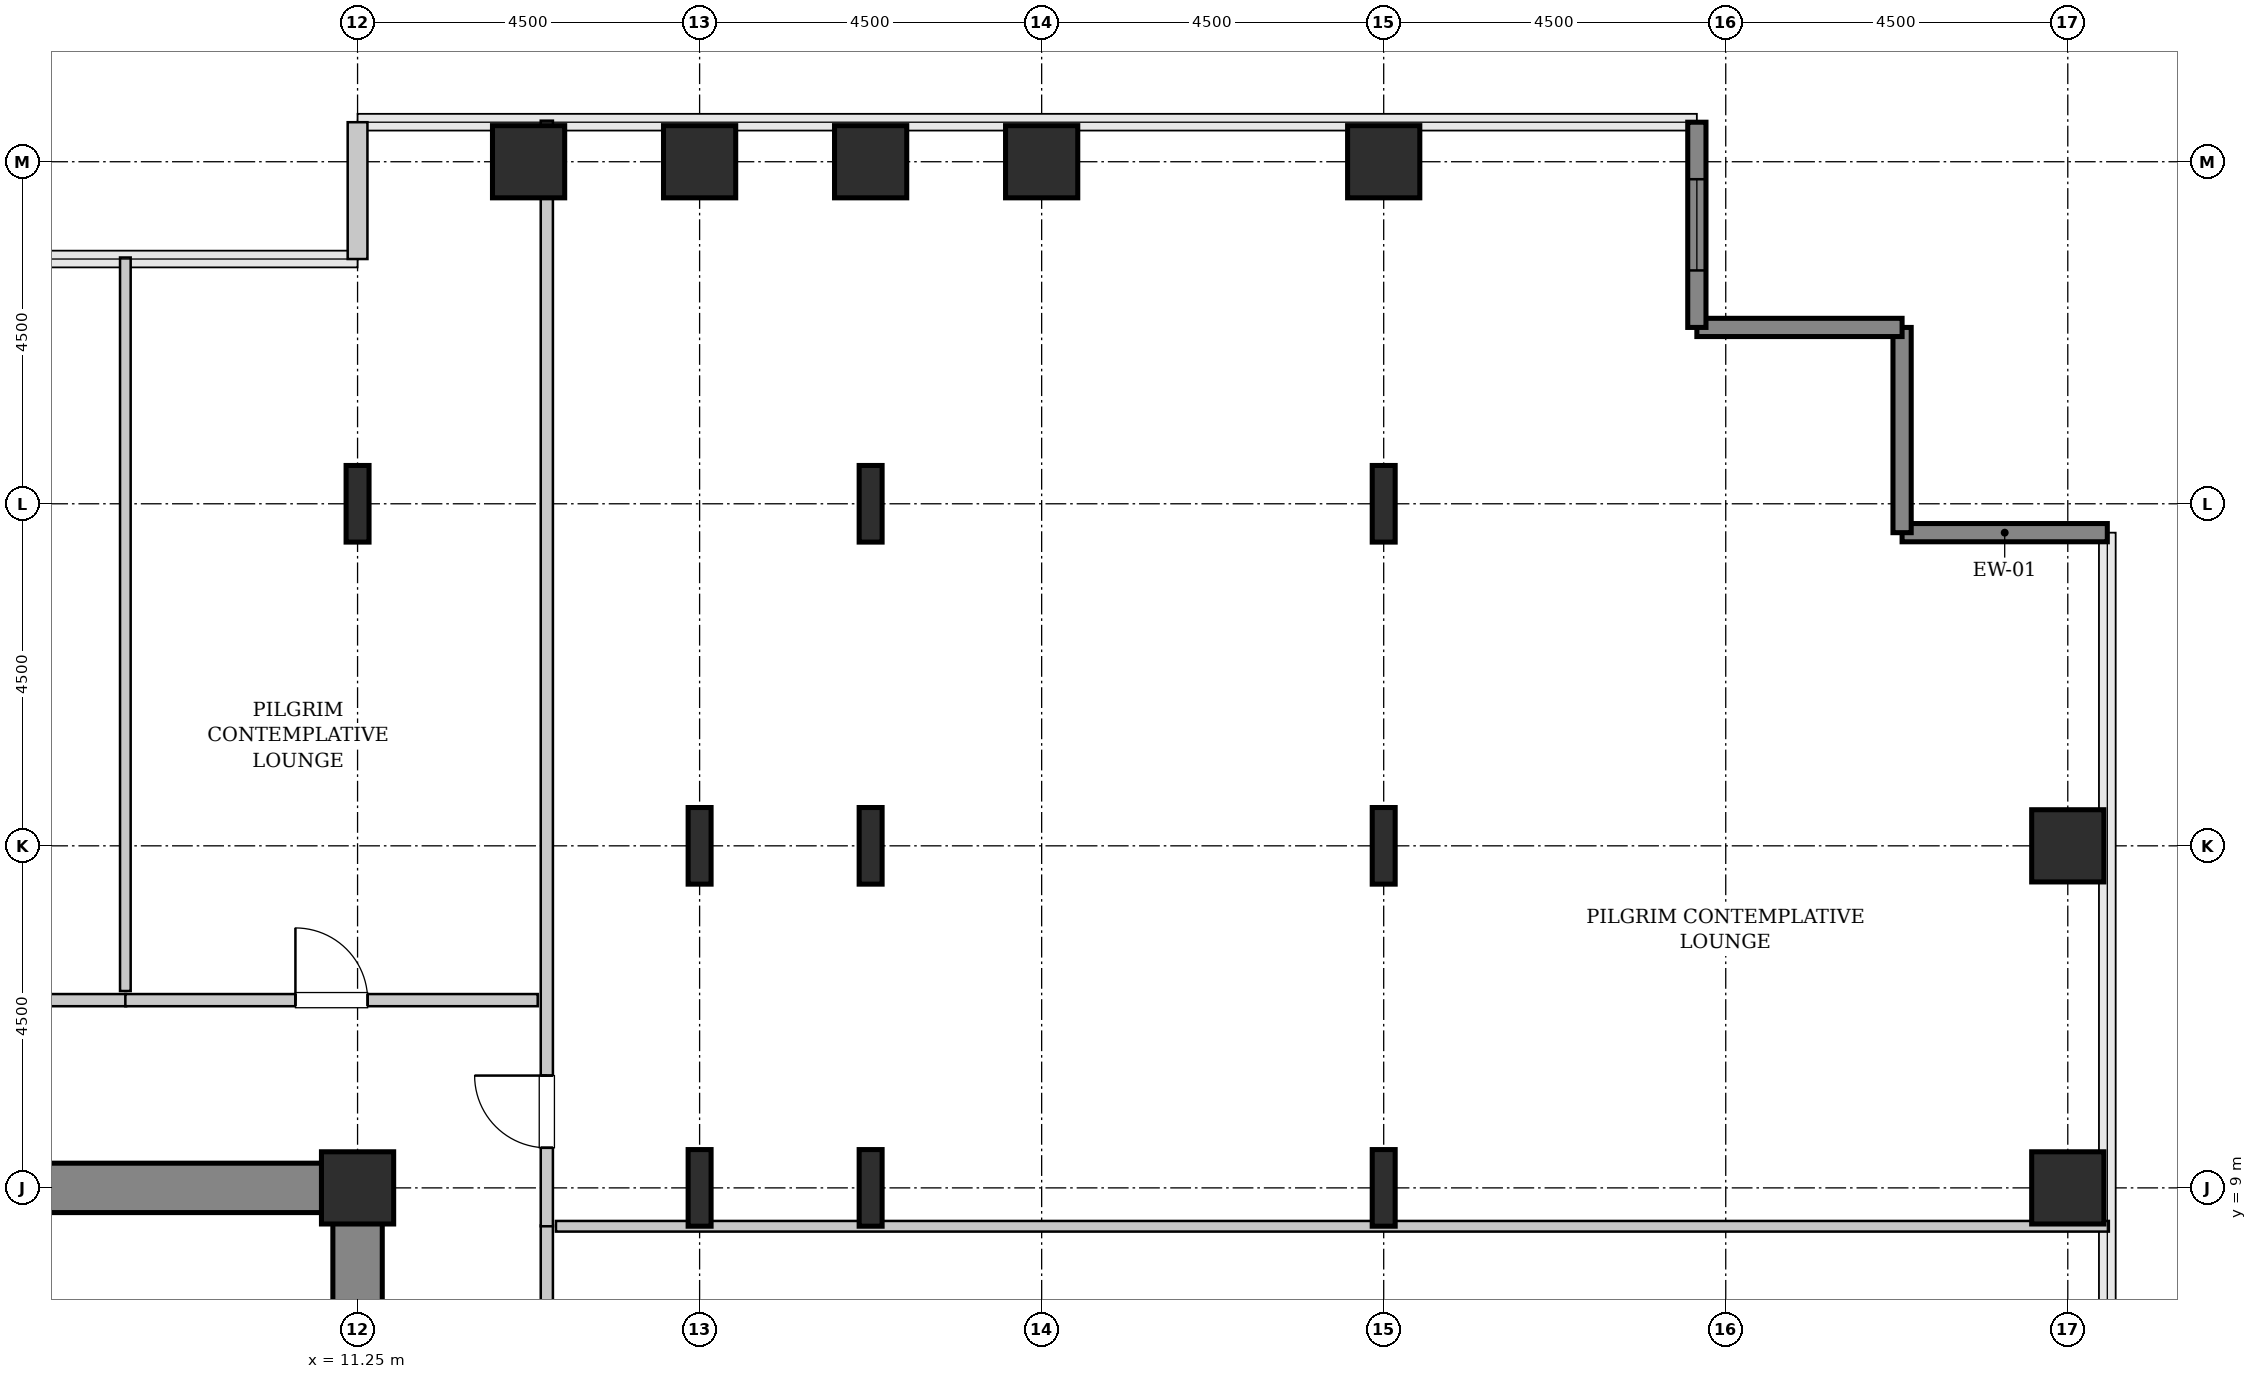
"""IFC4 building model, lengths in metres.
Left out: names, types, materials, properties, quantities, classifications, styles, units other than length and angle.
Written with IfcOpenShell. Run it as: python <this file> out.ifc"""

import sys

from ifc_helpers import new_model, si_unit, direction, frame, frame_2d, origin, origin_2d, place, context, subcontext, project, spatial, rectangle, hollow_rectangle, i_section, extrude, source, transform, mapped, element, fill, save


model = new_model("IFC4")
c1 = context("Model", 3, precision=1e-05, world=origin(), true_north=direction((0.0, 1.0)))
c2 = subcontext(c1, "Body", "Model", "MODEL_VIEW")
j1 = project(units=[si_unit("LENGTHUNIT", "METRE"), si_unit("PLANEANGLEUNIT", "RADIAN")], contexts=[c1])
p1 = place(None, origin())
s1 = spatial("IfcSite", under=j1, at=p1, CompositionType="ELEMENT")
p2 = place(p1, origin())
s2 = spatial("IfcBuilding", under=s1, at=p2, CompositionType="ELEMENT")
p3 = place(p2, frame((0.0, 0.0, 40.6)))
s3 = spatial("IfcBuildingStorey", under=s2, at=p3, CompositionType="ELEMENT", Elevation=40.6)
m1 = source(origin(), c2, "Body", "SweptSolid", [
    extrude(rectangle(XDim=10.025, YDim=0.65, at=frame_2d((5.012, 0.0))), origin(), (0.0, 0.0, 1.0), 3.8),
])
p4 = place(p3, frame((1.55, 9.0, 0.0), z_axis=(0.0, 0.0, 1.0), x_axis=(1.0, 0.0, 0.0)))
e1 = element("IfcWall", 1, at=p4, inside=s3, PredefinedType="SHEAR", context=c2, shape_type="MappedRepresentation", body=[
    mapped(m1, transform((0.0, 0.0, 0.0), x_axis=(1.0, 0.0, 0.0), y_axis=(0.0, 1.0, 0.0), z_axis=(0.0, 0.0, 1.0), scale=1.0)),
])
m2 = source(origin(), c2, "Body", "SweptSolid", [
    extrude(rectangle(XDim=7.325, YDim=0.65, at=frame_2d((3.663, 0.0))), origin(), (0.0, 0.0, 1.0), 3.8),
])
p5 = place(p3, frame((11.25, 1.35, 0.0), z_axis=(0.0, 0.0, 1.0), x_axis=(0.0, 1.0, 0.0)))
e2 = element("IfcWall", 2, at=p5, inside=s3, PredefinedType="SHEAR", context=c2, shape_type="MappedRepresentation", body=[
    mapped(m2, transform((0.0, 0.0, 0.0), x_axis=(1.0, 0.0, 0.0), y_axis=(0.0, 1.0, 0.0), z_axis=(0.0, 0.0, 1.0), scale=1.0)),
])
m3 = source(origin(), c2, "Body", "SweptSolid", [
    extrude(hollow_rectangle(XDim=0.95, YDim=0.95, WallThickness=0.045, InnerFilletRadius=0.045, OuterFilletRadius=0.09, at=origin_2d()), origin(), (0.0, 0.0, 1.0), 3.8),
])
p6 = place(p3, frame((11.25, 9.0, 0.0), z_axis=(0.0, 0.0, 1.0), x_axis=(1.0, 0.0, 0.0)))
e3 = element("IfcColumn", 3, at=p6, inside=s3, PredefinedType="COLUMN", context=c2, shape_type="MappedRepresentation", body=[
    mapped(m3, transform((0.0, 0.0, 0.0), x_axis=(1.0, 0.0, 0.0), y_axis=(0.0, 1.0, 0.0), z_axis=(0.0, 0.0, 1.0), scale=1.0)),
])
m4 = source(origin(), c2, "Body", "SweptSolid", [
    extrude(i_section(OverallWidth=0.302, OverallDepth=1.008, WebThickness=0.021, FlangeThickness=0.04, FilletRadius=0.03, at=origin_2d()), origin(), (0.0, 0.0, 1.0), 3.8),
])
p7 = place(p3, frame((11.25, 18.0, 0.0), z_axis=(0.0, 0.0, 1.0), x_axis=(1.0, 0.0, 0.0)))
e4 = element("IfcColumn", 4, at=p7, inside=s3, PredefinedType="COLUMN", context=c2, shape_type="MappedRepresentation", body=[
    mapped(m4, transform((0.0, 0.0, 0.0), x_axis=(1.0, 0.0, 0.0), y_axis=(0.0, 1.0, 0.0), z_axis=(0.0, 0.0, 1.0), scale=1.0)),
])
m5 = source(origin(), c2, "Body", "SweptSolid", [
    extrude(hollow_rectangle(XDim=0.95, YDim=0.95, WallThickness=0.045, InnerFilletRadius=0.045, OuterFilletRadius=0.09, at=origin_2d()), origin(), (0.0, 0.0, 1.0), 3.8),
])
p8 = place(p3, frame((13.5, 22.5, 0.0), z_axis=(0.0, 0.0, 1.0), x_axis=(1.0, 0.0, 0.0)))
e5 = element("IfcColumn", 5, at=p8, inside=s3, PredefinedType="COLUMN", context=c2, shape_type="MappedRepresentation", body=[
    mapped(m5, transform((0.0, 0.0, 0.0), x_axis=(1.0, 0.0, 0.0), y_axis=(0.0, 1.0, 0.0), z_axis=(0.0, 0.0, 1.0), scale=1.0)),
])
for number, where, z_axis, x_axis in (
    (6, (15.75, 9.0, 0.0), (0.0, 0.0, 1.0), (1.0, 0.0, 0.0)),
    (7, (15.75, 13.5, 0.0), (0.0, 0.0, 1.0), (1.0, 0.0, 0.0)),
):
    element("IfcColumn", number, at=place(p3, frame(where, z_axis=z_axis, x_axis=x_axis)), inside=s3, PredefinedType="COLUMN", context=c2, shape_type="MappedRepresentation", body=[
        mapped(m4, transform((0.0, 0.0, 0.0), x_axis=(1.0, 0.0, 0.0), y_axis=(0.0, 1.0, 0.0), z_axis=(0.0, 0.0, 1.0), scale=1.0)),
    ])
p9 = place(p3, frame((15.75, 22.5, 0.0), z_axis=(0.0, 0.0, 1.0), x_axis=(1.0, 0.0, 0.0)))
e8 = element("IfcColumn", 8, at=p9, inside=s3, PredefinedType="COLUMN", context=c2, shape_type="MappedRepresentation", body=[
    mapped(m5, transform((0.0, 0.0, 0.0), x_axis=(1.0, 0.0, 0.0), y_axis=(0.0, 1.0, 0.0), z_axis=(0.0, 0.0, 1.0), scale=1.0)),
])
for number, where, z_axis, x_axis in (
    (9, (18.0, 9.0, 0.0), (0.0, 0.0, 1.0), (1.0, 0.0, 0.0)),
    (10, (18.0, 13.5, 0.0), (0.0, 0.0, 1.0), (1.0, 0.0, 0.0)),
    (11, (18.0, 18.0, 0.0), (0.0, 0.0, 1.0), (1.0, 0.0, 0.0)),
):
    element("IfcColumn", number, at=place(p3, frame(where, z_axis=z_axis, x_axis=x_axis)), inside=s3, PredefinedType="COLUMN", context=c2, shape_type="MappedRepresentation", body=[
        mapped(m4, transform((0.0, 0.0, 0.0), x_axis=(1.0, 0.0, 0.0), y_axis=(0.0, 1.0, 0.0), z_axis=(0.0, 0.0, 1.0), scale=1.0)),
    ])
for number, where, z_axis, x_axis in (
    (12, (18.0, 22.5, 0.0), (0.0, 0.0, 1.0), (1.0, 0.0, 0.0)),
    (13, (20.25, 22.5, 0.0), (0.0, 0.0, 1.0), (1.0, 0.0, 0.0)),
):
    element("IfcColumn", number, at=place(p3, frame(where, z_axis=z_axis, x_axis=x_axis)), inside=s3, PredefinedType="COLUMN", context=c2, shape_type="MappedRepresentation", body=[
        mapped(m5, transform((0.0, 0.0, 0.0), x_axis=(1.0, 0.0, 0.0), y_axis=(0.0, 1.0, 0.0), z_axis=(0.0, 0.0, 1.0), scale=1.0)),
    ])
for number, where, z_axis, x_axis in (
    (14, (24.75, 9.0, 0.0), (0.0, 0.0, 1.0), (1.0, 0.0, 0.0)),
    (15, (24.75, 13.5, 0.0), (0.0, 0.0, 1.0), (1.0, 0.0, 0.0)),
    (16, (24.75, 18.0, 0.0), (0.0, 0.0, 1.0), (1.0, 0.0, 0.0)),
):
    element("IfcColumn", number, at=place(p3, frame(where, z_axis=z_axis, x_axis=x_axis)), inside=s3, PredefinedType="COLUMN", context=c2, shape_type="MappedRepresentation", body=[
        mapped(m4, transform((0.0, 0.0, 0.0), x_axis=(1.0, 0.0, 0.0), y_axis=(0.0, 1.0, 0.0), z_axis=(0.0, 0.0, 1.0), scale=1.0)),
    ])
for number, where, z_axis, x_axis in (
    (17, (24.75, 22.5, 0.0), (0.0, 0.0, 1.0), (1.0, 0.0, 0.0)),
    (18, (33.75, 9.0, 0.0), (0.0, 0.0, 1.0), (1.0, 0.0, 0.0)),
    (19, (33.75, 13.5, 0.0), (0.0, 0.0, 1.0), (1.0, 0.0, 0.0)),
):
    element("IfcColumn", number, at=place(p3, frame(where, z_axis=z_axis, x_axis=x_axis)), inside=s3, PredefinedType="COLUMN", context=c2, shape_type="MappedRepresentation", body=[
        mapped(m5, transform((0.0, 0.0, 0.0), x_axis=(1.0, 0.0, 0.0), y_axis=(0.0, 1.0, 0.0), z_axis=(0.0, 0.0, 1.0), scale=1.0)),
    ])
m6 = source(origin(), c2, "Body", "SweptSolid", [
    extrude(rectangle(XDim=2.7, YDim=0.24, at=frame_2d((1.35, 0.0))), origin(), (0.0, 0.0, 1.0), 3.55),
])
for number, where, z_axis, x_axis in (
    (20, (34.27, 17.62, 0.0), (0.0, 0.0, 1.0), (-1.0, 0.0, 0.0)),
    (21, (31.57, 17.62, 0.0), (0.0, 0.0, 1.0), (0.0, 1.0, 0.0)),
    (22, (31.57, 20.32, 0.0), (0.0, 0.0, 1.0), (-1.0, 0.0, 0.0)),
):
    element("IfcWall", number, at=place(p3, frame(where, z_axis=z_axis, x_axis=x_axis)), inside=s3, PredefinedType="SHEAR", context=c2, shape_type="MappedRepresentation", body=[
        mapped(m6, transform((0.0, 0.0, 0.0), x_axis=(1.0, 0.0, 0.0), y_axis=(0.0, 1.0, 0.0), z_axis=(0.0, 0.0, 1.0), scale=1.0)),
    ])
p10 = place(p3, frame((28.87, 20.32, 0.0), z_axis=(0.0, 0.0, 1.0), x_axis=(0.0, 1.0, 0.0)))
e23 = element("IfcWall", 23, at=p10, inside=s3, PredefinedType="SHEAR", context=c2, shape_type="MappedRepresentation", body=[
    mapped(m6, transform((0.0, 0.0, 0.0), x_axis=(1.0, 0.0, 0.0), y_axis=(0.0, 1.0, 0.0), z_axis=(0.0, 0.0, 1.0), scale=1.0)),
])
p11 = place(p10, frame((0.75, 0.0, 0.85)))
e24 = element("IfcOpeningElement", 24, at=p11, cuts=e23, PredefinedType="OPENING", context=c2, shape_type="SweptSolid", body=[
    extrude(rectangle(XDim=1.2, YDim=1.8, at=frame_2d((0.6, 0.9))), frame((0.0, 0.13, 0.0), z_axis=(0.0, -1.0, 0.0), x_axis=(1.0, 0.0, 0.0)), (0.0, 0.0, 1.0), 0.26),
])
m7 = source(origin(), c2, "Body", "SweptSolid", [
    extrude(rectangle(XDim=1.8, YDim=0.26, at=frame_2d((0.9, 0.0))), origin(), (0.0, 0.0, 1.0), 3.55),
])
p12 = place(p3, frame((11.25, 23.02, 0.0), z_axis=(0.0, 0.0, 1.0), x_axis=(0.0, -1.0, 0.0)))
e25 = element("IfcWall", 25, at=p12, inside=s3, PredefinedType="SOLIDWALL", context=c2, shape_type="MappedRepresentation", body=[
    mapped(m7, transform((0.0, 0.0, 0.0), x_axis=(1.0, 0.0, 0.0), y_axis=(0.0, 1.0, 0.0), z_axis=(0.0, 0.0, 1.0), scale=1.0)),
])
m8 = source(origin(), c2, "Body", "SweptSolid", [
    extrude(rectangle(XDim=3.4, YDim=0.16, at=frame_2d((1.7, 0.0))), origin(), (0.0, 0.0, 1.0), 3.535),
])
p13 = place(p3, frame((13.74, 5.105, 0.0), z_axis=(0.0, 0.0, 1.0), x_axis=(0.0, 1.0, 0.0)))
e26 = element("IfcWall", 26, at=p13, inside=s3, PredefinedType="PARTITIONING", context=c2, shape_type="MappedRepresentation", body=[
    mapped(m8, transform((0.0, 0.0, 0.0), x_axis=(1.0, 0.0, 0.0), y_axis=(0.0, 1.0, 0.0), z_axis=(0.0, 0.0, 1.0), scale=1.0)),
])
p14 = place(p13, frame((1.225, 0.0, 0.0)))
e27 = element("IfcOpeningElement", 27, at=p14, cuts=e26, PredefinedType="OPENING", context=c2, shape_type="SweptSolid", body=[
    extrude(rectangle(XDim=0.95, YDim=2.1, at=frame_2d((0.475, 1.05))), frame((0.0, 0.09, 0.0), z_axis=(0.0, -1.0, 0.0), x_axis=(1.0, 0.0, 0.0)), (0.0, 0.0, 1.0), 0.18),
])
m9 = source(origin(), c2, "Body", "SweptSolid", [
    extrude(rectangle(XDim=20.43, YDim=0.14, at=frame_2d((10.215, 0.0))), origin(), (0.0, 0.0, 1.0), 2.825),
])
p15 = place(p3, frame((13.86, 8.495, 0.0), z_axis=(0.0, 0.0, 1.0), x_axis=(1.0, 0.0, 0.0)))
e28 = element("IfcWall", 28, at=p15, inside=s3, PredefinedType="PARTITIONING", context=c2, shape_type="MappedRepresentation", body=[
    mapped(m9, transform((0.0, 0.0, 0.0), x_axis=(1.0, 0.0, 0.0), y_axis=(0.0, 1.0, 0.0), z_axis=(0.0, 0.0, 1.0), scale=1.0)),
])
m10 = source(origin(), c2, "Body", "SweptSolid", [
    extrude(rectangle(XDim=14.545, YDim=0.16, at=frame_2d((7.272, 0.0))), origin(), (0.0, 0.0, 1.0), 3.535),
])
p16 = place(p3, frame((13.74, 8.495, 0.0), z_axis=(0.0, 0.0, 1.0), x_axis=(0.0, 1.0, 0.0)))
e29 = element("IfcWall", 29, at=p16, inside=s3, PredefinedType="PARTITIONING", context=c2, shape_type="MappedRepresentation", body=[
    mapped(m10, transform((0.0, 0.0, 0.0), x_axis=(1.0, 0.0, 0.0), y_axis=(0.0, 1.0, 0.0), z_axis=(0.0, 0.0, 1.0), scale=1.0)),
])
p17 = place(p16, frame((1.032, 0.0, 0.0)))
e30 = element("IfcOpeningElement", 30, at=p17, cuts=e29, PredefinedType="OPENING", context=c2, shape_type="SweptSolid", body=[
    extrude(rectangle(XDim=0.95, YDim=2.1, at=frame_2d((0.475, 1.05))), frame((0.0, 0.09, 0.0), z_axis=(0.0, -1.0, 0.0), x_axis=(1.0, 0.0, 0.0)), (0.0, 0.0, 1.0), 0.18),
])
m11 = source(origin(), c2, "Body", "SweptSolid", [
    extrude(rectangle(XDim=5.81, YDim=0.16, at=frame_2d((2.905, 0.0))), origin(), (0.0, 0.0, 1.0), 3.535),
])
p18 = place(p3, frame((2.395, 11.47, 0.0), z_axis=(0.0, 0.0, 1.0), x_axis=(1.0, 0.0, 0.0)))
e31 = element("IfcWall", 31, at=p18, inside=s3, PredefinedType="PARTITIONING", context=c2, shape_type="MappedRepresentation", body=[
    mapped(m11, transform((0.0, 0.0, 0.0), x_axis=(1.0, 0.0, 0.0), y_axis=(0.0, 1.0, 0.0), z_axis=(0.0, 0.0, 1.0), scale=1.0)),
])
p19 = place(p18, frame((2.43, 0.0, 0.0)))
e32 = element("IfcOpeningElement", 32, at=p19, cuts=e31, PredefinedType="OPENING", context=c2, shape_type="SweptSolid", body=[
    extrude(rectangle(XDim=0.95, YDim=2.1, at=frame_2d((0.475, 1.05))), frame((0.0, 0.09, 0.0), z_axis=(0.0, -1.0, 0.0), x_axis=(1.0, 0.0, 0.0)), (0.0, 0.0, 1.0), 0.18),
])
m12 = source(origin(), c2, "Body", "SweptSolid", [
    extrude(rectangle(XDim=9.65, YDim=0.14, at=frame_2d((4.825, 0.0))), origin(), (0.0, 0.0, 1.0), 3.535),
])
p20 = place(p3, frame((8.195, 11.59, 0.0), z_axis=(0.0, 0.0, 1.0), x_axis=(0.0, 1.0, 0.0)))
e33 = element("IfcWall", 33, at=p20, inside=s3, PredefinedType="PARTITIONING", context=c2, shape_type="MappedRepresentation", body=[
    mapped(m12, transform((0.0, 0.0, 0.0), x_axis=(1.0, 0.0, 0.0), y_axis=(0.0, 1.0, 0.0), z_axis=(0.0, 0.0, 1.0), scale=1.0)),
])
m13 = source(origin(), c2, "Body", "SweptSolid", [
    extrude(rectangle(XDim=5.425, YDim=0.16, at=frame_2d((2.712, 0.0))), origin(), (0.0, 0.0, 1.0), 3.535),
])
p21 = place(p3, frame((8.195, 11.47, 0.0), z_axis=(0.0, 0.0, 1.0), x_axis=(1.0, 0.0, 0.0)))
e34 = element("IfcWall", 34, at=p21, inside=s3, PredefinedType="PARTITIONING", context=c2, shape_type="MappedRepresentation", body=[
    mapped(m13, transform((0.0, 0.0, 0.0), x_axis=(1.0, 0.0, 0.0), y_axis=(0.0, 1.0, 0.0), z_axis=(0.0, 0.0, 1.0), scale=1.0)),
])
p22 = place(p21, frame((2.238, 0.0, 0.0)))
e35 = element("IfcOpeningElement", 35, at=p22, cuts=e34, PredefinedType="OPENING", context=c2, shape_type="SweptSolid", body=[
    extrude(rectangle(XDim=0.95, YDim=2.1, at=frame_2d((0.475, 1.05))), frame((0.0, 0.09, 0.0), z_axis=(0.0, -1.0, 0.0), x_axis=(1.0, 0.0, 0.0)), (0.0, 0.0, 1.0), 0.18),
])
m14 = source(origin(), c2, "Body", "SweptSolid", [
    extrude(rectangle(XDim=1.2, YDim=1.8, at=frame_2d((0.6, 0.9))), frame((0.0, 0.03, 0.0), z_axis=(0.0, -1.0, 0.0), x_axis=(1.0, 0.0, 0.0)), (0.0, 0.0, 1.0), 0.06),
])
p23 = place(p11, origin())
e36 = element("IfcWindow", 36, at=p23, inside=s3, PartitioningType="SINGLE_PANEL", PredefinedType="WINDOW", context=c2, shape_type="MappedRepresentation", body=[
    mapped(m14, transform((0.0, 0.0, 0.0), x_axis=(1.0, 0.0, 0.0), y_axis=(0.0, 1.0, 0.0), z_axis=(0.0, 0.0, 1.0), scale=1.0)),
])
fill(e24, e36)
m15 = source(origin(), c2, "Body", "SweptSolid", [
    extrude(rectangle(XDim=0.95, YDim=2.1, at=frame_2d((0.475, 1.05))), frame((0.0, 0.025, 0.0), z_axis=(0.0, -1.0, 0.0), x_axis=(1.0, 0.0, 0.0)), (0.0, 0.0, 1.0), 0.05),
])
p24 = place(p17, origin())
e37 = element("IfcDoor", 37, at=p24, inside=s3, OperationType="SINGLE_SWING_RIGHT", PredefinedType="DOOR", context=c2, shape_type="MappedRepresentation", body=[
    mapped(m15, transform((0.0, 0.0, 0.0), x_axis=(1.0, 0.0, 0.0), y_axis=(0.0, 1.0, 0.0), z_axis=(0.0, 0.0, 1.0), scale=1.0)),
])
fill(e30, e37)
p25 = place(p22, origin())
e38 = element("IfcDoor", 38, at=p25, inside=s3, OperationType="SINGLE_SWING_LEFT", PredefinedType="DOOR", context=c2, shape_type="MappedRepresentation", body=[
    mapped(m15, transform((0.0, 0.0, 0.0), x_axis=(1.0, 0.0, 0.0), y_axis=(0.0, 1.0, 0.0), z_axis=(0.0, 0.0, 1.0), scale=1.0)),
])
fill(e35, e38)
save(model, sys.argv[1])
